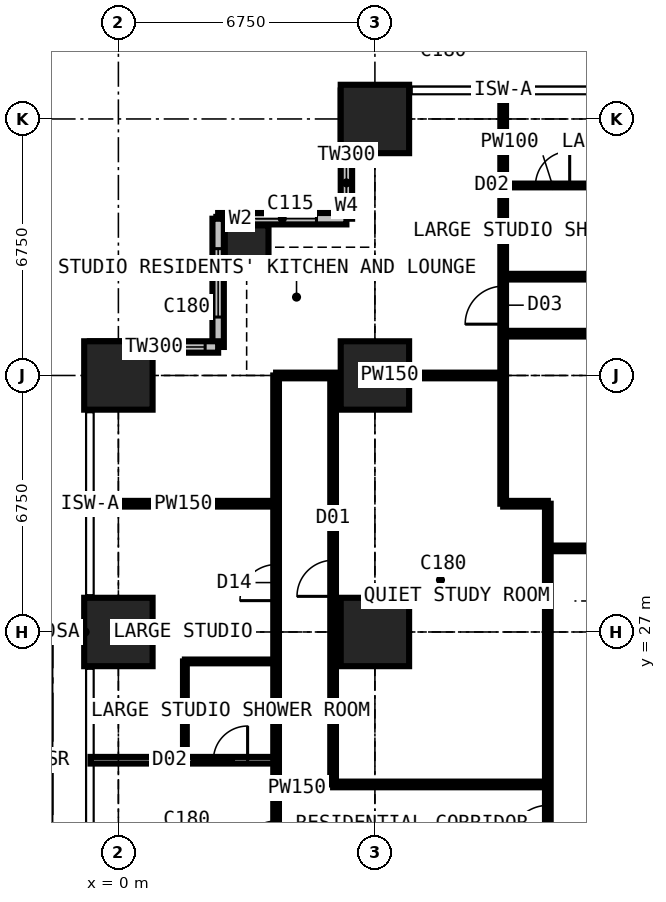
"""IFC4 building model, lengths in metres.
Left out: names, types, materials, properties, quantities, classifications, styles, units other than length and angle.
Written with IfcOpenShell. Run it as: python <this file> out.ifc"""

import sys

from ifc_helpers import new_model, si_unit, direction, frame, frame_2d, origin, origin_2d, place, context, subcontext, project, spatial, rectangle, extrude, element, fill, save


model = new_model("IFC4")
c1 = context("Model", 3, precision=1e-05, world=origin(), true_north=direction((0.0, 1.0)))
c2 = subcontext(c1, "Body", "Model", "MODEL_VIEW")
j1 = project(units=[si_unit("LENGTHUNIT", "METRE"), si_unit("PLANEANGLEUNIT", "RADIAN")], contexts=[c1])
p1 = place(None, origin())
s1 = spatial("IfcSite", under=j1, at=p1, CompositionType="ELEMENT")
p2 = place(p1, origin())
s2 = spatial("IfcBuilding", under=s1, at=p2, CompositionType="ELEMENT")
p3 = place(p2, frame((0.0, 0.0, 54.0)))
s3 = spatial("IfcBuildingStorey", under=s2, at=p3, CompositionType="ELEMENT", Elevation=54.0)
for number, where, z_axis, x_axis in (
    (1, (0.0, 27.0, 0.0), (0.0, 0.0, 1.0), (1.0, 0.0, 0.0)),
    (2, (0.0, 33.75, 0.0), (0.0, 0.0, 1.0), (1.0, 0.0, 0.0)),
):
    element("IfcColumn", number, at=place(p3, frame(where, z_axis=z_axis, x_axis=x_axis)), inside=s3, PredefinedType="COLUMN", context=c2, shape_type="SweptSolid", body=[
        extrude(rectangle(XDim=1.8, YDim=1.8, at=origin_2d()), origin(), (0.0, 0.0, 1.0), 3.6),
    ])
p4 = place(p3, frame((3.375, 37.125, 0.0), z_axis=(0.0, 0.0, 1.0), x_axis=(1.0, 0.0, 0.0)))
e3 = element("IfcColumn", 3, at=p4, inside=s3, PredefinedType="COLUMN", context=c2, shape_type="SweptSolid", body=[
    extrude(rectangle(XDim=1.15, YDim=1.15, at=origin_2d()), origin(), (0.0, 0.0, 1.0), 3.6),
])
for number, where, z_axis, x_axis in (
    (4, (6.75, 27.0, 0.0), (0.0, 0.0, 1.0), (1.0, 0.0, 0.0)),
    (5, (6.75, 33.75, 0.0), (0.0, 0.0, 1.0), (1.0, 0.0, 0.0)),
    (6, (6.75, 40.5, 0.0), (0.0, 0.0, 1.0), (1.0, 0.0, 0.0)),
):
    element("IfcColumn", number, at=place(p3, frame(where, z_axis=z_axis, x_axis=x_axis)), inside=s3, PredefinedType="COLUMN", context=c2, shape_type="SweptSolid", body=[
        extrude(rectangle(XDim=1.8, YDim=1.8, at=origin_2d()), origin(), (0.0, 0.0, 1.0), 3.6),
    ])
p5 = place(p3, frame((6.0, 41.25, 0.0), z_axis=(0.0, 0.0, 1.0), x_axis=(0.0, -1.0, 0.0)))
e7 = element("IfcWall", 7, at=p5, inside=s3, PredefinedType="SOLIDWALL", context=c2, shape_type="SweptSolid", body=[
    extrude(rectangle(XDim=3.375, YDim=0.3, at=frame_2d((1.688, 0.0))), origin(), (0.0, 0.0, 1.0), 3.375),
])
p6 = place(p5, frame((1.833, 0.0, 0.9)))
e8 = element("IfcOpeningElement", 8, at=p6, cuts=e7, PredefinedType="OPENING", context=c2, shape_type="SweptSolid", body=[
    extrude(rectangle(XDim=1.2, YDim=1.8, at=frame_2d((0.6, 0.9))), frame((0.0, 0.16, 0.0), z_axis=(0.0, -1.0, 0.0), x_axis=(1.0, 0.0, 0.0)), (0.0, 0.0, 1.0), 0.32),
])
p7 = place(p3, frame((6.0, 37.875, 0.0), z_axis=(0.0, 0.0, 1.0), x_axis=(-1.0, 0.0, 0.0)))
e9 = element("IfcWall", 9, at=p7, inside=s3, PredefinedType="SOLIDWALL", context=c2, shape_type="SweptSolid", body=[
    extrude(rectangle(XDim=3.375, YDim=0.3, at=frame_2d((1.688, 0.0))), origin(), (0.0, 0.0, 1.0), 3.375),
])
p8 = place(p7, frame((0.788, 0.0, 0.6)))
e10 = element("IfcOpeningElement", 10, at=p8, cuts=e9, PredefinedType="OPENING", context=c2, shape_type="SweptSolid", body=[
    extrude(rectangle(XDim=1.8, YDim=2.1, at=frame_2d((0.9, 1.05))), frame((0.0, 0.16, 0.0), z_axis=(0.0, -1.0, 0.0), x_axis=(1.0, 0.0, 0.0)), (0.0, 0.0, 1.0), 0.32),
])
p9 = place(p3, frame((2.625, 37.875, 0.0), z_axis=(0.0, 0.0, 1.0), x_axis=(0.0, -1.0, 0.0)))
e11 = element("IfcWall", 11, at=p9, inside=s3, PredefinedType="SOLIDWALL", context=c2, shape_type="SweptSolid", body=[
    extrude(rectangle(XDim=3.375, YDim=0.3, at=frame_2d((1.688, 0.0))), origin(), (0.0, 0.0, 1.0), 3.375),
])
p10 = place(p9, frame((0.788, 0.0, 0.6)))
e12 = element("IfcOpeningElement", 12, at=p10, cuts=e11, PredefinedType="OPENING", context=c2, shape_type="SweptSolid", body=[
    extrude(rectangle(XDim=1.8, YDim=2.1, at=frame_2d((0.9, 1.05))), frame((0.0, 0.16, 0.0), z_axis=(0.0, -1.0, 0.0), x_axis=(1.0, 0.0, 0.0)), (0.0, 0.0, 1.0), 0.32),
])
p11 = place(p3, frame((2.625, 34.5, 0.0), z_axis=(0.0, 0.0, 1.0), x_axis=(-1.0, 0.0, 0.0)))
e13 = element("IfcWall", 13, at=p11, inside=s3, PredefinedType="SOLIDWALL", context=c2, shape_type="SweptSolid", body=[
    extrude(rectangle(XDim=3.375, YDim=0.3, at=frame_2d((1.688, 0.0))), origin(), (0.0, 0.0, 1.0), 3.375),
])
p12 = place(p11, frame((0.343, 0.0, 0.9)))
e14 = element("IfcOpeningElement", 14, at=p12, cuts=e13, PredefinedType="OPENING", context=c2, shape_type="SweptSolid", body=[
    extrude(rectangle(XDim=1.2, YDim=1.8, at=frame_2d((0.6, 0.9))), frame((0.0, 0.16, 0.0), z_axis=(0.0, -1.0, 0.0), x_axis=(1.0, 0.0, 0.0)), (0.0, 0.0, 1.0), 0.32),
])
p13 = place(p3, frame((-0.734, 23.625, 0.0), z_axis=(0.0, 0.0, 1.0), x_axis=(1.0, 0.0, 0.0)))
e15 = element("IfcWall", 15, at=p13, inside=s3, PredefinedType="PARTITIONING", context=c2, shape_type="SweptSolid", body=[
    extrude(rectangle(XDim=4.884, YDim=0.175, at=frame_2d((2.442, 0.0))), origin(), (0.0, 0.0, 1.0), 3.375),
])
p14 = place(p13, frame((3.234, 0.0, 0.0)))
e16 = element("IfcOpeningElement", 16, at=p14, cuts=e15, PredefinedType="OPENING", context=c2, shape_type="SweptSolid", body=[
    extrude(rectangle(XDim=0.9, YDim=2.2, at=frame_2d((0.45, 1.1))), frame((0.0, 0.097, 0.0), z_axis=(0.0, -1.0, 0.0), x_axis=(1.0, 0.0, 0.0)), (0.0, 0.0, 1.0), 0.195),
])
p15 = place(p3, frame((-0.734, 30.375, 0.0), z_axis=(0.0, 0.0, 1.0), x_axis=(1.0, 0.0, 0.0)))
e17 = element("IfcWall", 17, at=p15, inside=s3, PredefinedType="PARTITIONING", context=c2, shape_type="SweptSolid", body=[
    extrude(rectangle(XDim=4.884, YDim=0.15, at=frame_2d((2.442, 0.0))), origin(), (0.0, 0.0, 1.0), 3.375),
])
p16 = place(p3, frame((1.75, 23.625, 0.0), z_axis=(0.0, 0.0, 1.0), x_axis=(0.0, 1.0, 0.0)))
e18 = element("IfcWall", 18, at=p16, inside=s3, PredefinedType="PARTITIONING", context=c2, shape_type="SweptSolid", body=[
    extrude(rectangle(XDim=2.6, YDim=0.1, at=frame_2d((1.3, 0.0))), origin(), (0.0, 0.0, 1.0), 3.375),
])
p17 = place(p3, frame((1.75, 26.225, 0.0), z_axis=(0.0, 0.0, 1.0), x_axis=(1.0, 0.0, 0.0)))
e19 = element("IfcWall", 19, at=p17, inside=s3, PredefinedType="PARTITIONING", context=c2, shape_type="SweptSolid", body=[
    extrude(rectangle(XDim=2.4, YDim=0.1, at=frame_2d((1.2, 0.0))), origin(), (0.0, 0.0, 1.0), 3.375),
])
p18 = place(p3, frame((4.15, 10.125, 0.0), z_axis=(0.0, 0.0, 1.0), x_axis=(0.0, 1.0, 0.0)))
e20 = element("IfcWall", 20, at=p18, inside=s3, PredefinedType="PARTITIONING", context=c2, shape_type="SweptSolid", body=[
    extrude(rectangle(XDim=23.625, YDim=0.15, at=frame_2d((11.812, 0.0))), origin(), (0.0, 0.0, 1.0), 3.375),
])
p19 = place(p18, frame((4.2, 0.0, 0.0)))
e21 = element("IfcOpeningElement", 21, at=p19, cuts=e20, PredefinedType="OPENING", context=c2, shape_type="SweptSolid", body=[
    extrude(rectangle(XDim=0.95, YDim=2.2, at=frame_2d((0.475, 1.1))), frame((0.0, 0.085, 0.0), z_axis=(0.0, -1.0, 0.0), x_axis=(1.0, 0.0, 0.0)), (0.0, 0.0, 1.0), 0.17),
])
p20 = place(p18, frame((10.95, 0.0, 0.0)))
e22 = element("IfcOpeningElement", 22, at=p20, cuts=e20, PredefinedType="OPENING", context=c2, shape_type="SweptSolid", body=[
    extrude(rectangle(XDim=0.95, YDim=2.2, at=frame_2d((0.475, 1.1))), frame((0.0, 0.085, 0.0), z_axis=(0.0, -1.0, 0.0), x_axis=(1.0, 0.0, 0.0)), (0.0, 0.0, 1.0), 0.17),
])
p21 = place(p18, frame((17.7, 0.0, 0.0)))
e23 = element("IfcOpeningElement", 23, at=p21, cuts=e20, PredefinedType="OPENING", context=c2, shape_type="SweptSolid", body=[
    extrude(rectangle(XDim=0.95, YDim=2.2, at=frame_2d((0.475, 1.1))), frame((0.0, 0.085, 0.0), z_axis=(0.0, -1.0, 0.0), x_axis=(1.0, 0.0, 0.0)), (0.0, 0.0, 1.0), 0.17),
])
p22 = place(p3, frame((4.15, 33.75, 0.0), z_axis=(0.0, 0.0, 1.0), x_axis=(1.0, 0.0, 0.0)))
e24 = element("IfcWall", 24, at=p22, inside=s3, PredefinedType="PARTITIONING", context=c2, shape_type="SweptSolid", body=[
    extrude(rectangle(XDim=5.975, YDim=0.15, at=frame_2d((2.988, 0.0))), origin(), (0.0, 0.0, 1.0), 2.877),
])
p23 = place(p3, frame((5.65, 22.988, 0.0), z_axis=(0.0, 0.0, 1.0), x_axis=(0.0, 1.0, 0.0)))
e25 = element("IfcWall", 25, at=p23, inside=s3, PredefinedType="PARTITIONING", context=c2, shape_type="SweptSolid", body=[
    extrude(rectangle(XDim=10.762, YDim=0.15, at=frame_2d((5.381, 0.0))), origin(), (0.0, 0.0, 1.0), 3.375),
])
p24 = place(p23, frame((4.95, 0.0, 0.0)))
e26 = element("IfcOpeningElement", 26, at=p24, cuts=e25, PredefinedType="OPENING", context=c2, shape_type="SweptSolid", body=[
    extrude(rectangle(XDim=0.95, YDim=2.2, at=frame_2d((0.475, 1.1))), frame((0.0, 0.085, 0.0), z_axis=(0.0, -1.0, 0.0), x_axis=(1.0, 0.0, 0.0)), (0.0, 0.0, 1.0), 0.17),
])
p25 = place(p3, frame((5.65, 22.988, 0.0), z_axis=(0.0, 0.0, 1.0), x_axis=(1.0, 0.0, 0.0)))
e27 = element("IfcWall", 27, at=p25, inside=s3, PredefinedType="PARTITIONING", context=c2, shape_type="SweptSolid", body=[
    extrude(rectangle(XDim=5.65, YDim=0.15, at=frame_2d((2.825, 0.0))), origin(), (0.0, 0.0, 1.0), 3.375),
])
p26 = place(p3, frame((10.125, 30.375, 0.0), z_axis=(0.0, 0.0, 1.0), x_axis=(0.0, 1.0, 0.0)))
e28 = element("IfcWall", 28, at=p26, inside=s3, PredefinedType="PARTITIONING", context=c2, shape_type="SweptSolid", body=[
    extrude(rectangle(XDim=10.859, YDim=0.15, at=frame_2d((5.429, 0.0))), origin(), (0.0, 0.0, 1.0), 3.375),
])
p27 = place(p26, frame((4.725, 0.0, 0.0)))
e29 = element("IfcOpeningElement", 29, at=p27, cuts=e28, PredefinedType="OPENING", context=c2, shape_type="SweptSolid", body=[
    extrude(rectangle(XDim=1.0, YDim=2.2, at=frame_2d((0.5, 1.1))), frame((0.0, 0.085, 0.0), z_axis=(0.0, -1.0, 0.0), x_axis=(1.0, 0.0, 0.0)), (0.0, 0.0, 1.0), 0.17),
])
p28 = place(p3, frame((10.125, 30.375, 0.0), z_axis=(0.0, 0.0, 1.0), x_axis=(1.0, 0.0, 0.0)))
e30 = element("IfcWall", 30, at=p28, inside=s3, PredefinedType="PARTITIONING", context=c2, shape_type="SweptSolid", body=[
    extrude(rectangle(XDim=1.175, YDim=0.15, at=frame_2d((0.587, 0.0))), origin(), (0.0, 0.0, 1.0), 3.375),
])
p29 = place(p3, frame((10.125, 34.85, 0.0), z_axis=(0.0, 0.0, 1.0), x_axis=(1.0, 0.0, 0.0)))
e31 = element("IfcWall", 31, at=p29, inside=s3, PredefinedType="PARTITIONING", context=c2, shape_type="SweptSolid", body=[
    extrude(rectangle(XDim=10.762, YDim=0.15, at=frame_2d((5.381, 0.0))), origin(), (0.0, 0.0, 1.0), 3.375),
])
p30 = place(p29, frame((4.9, 0.0, 0.0)))
e32 = element("IfcOpeningElement", 32, at=p30, cuts=e31, PredefinedType="OPENING", context=c2, shape_type="SweptSolid", body=[
    extrude(rectangle(XDim=0.95, YDim=2.2, at=frame_2d((0.475, 1.1))), frame((0.0, 0.085, 0.0), z_axis=(0.0, -1.0, 0.0), x_axis=(1.0, 0.0, 0.0)), (0.0, 0.0, 1.0), 0.17),
])
p31 = place(p3, frame((10.125, 36.35, 0.0), z_axis=(0.0, 0.0, 1.0), x_axis=(1.0, 0.0, 0.0)))
e33 = element("IfcWall", 33, at=p31, inside=s3, PredefinedType="PARTITIONING", context=c2, shape_type="SweptSolid", body=[
    extrude(rectangle(XDim=23.625, YDim=0.15, at=frame_2d((11.812, 0.0))), origin(), (0.0, 0.0, 1.0), 3.375),
])
p32 = place(p31, frame((20.5, 0.0, 0.0)))
e34 = element("IfcOpeningElement", 34, at=p32, cuts=e33, PredefinedType="OPENING", context=c2, shape_type="SweptSolid", body=[
    extrude(rectangle(XDim=0.95, YDim=2.2, at=frame_2d((0.475, 1.1))), frame((0.0, 0.085, 0.0), z_axis=(0.0, -1.0, 0.0), x_axis=(1.0, 0.0, 0.0)), (0.0, 0.0, 1.0), 0.17),
])
p33 = place(p31, frame((17.125, 0.0, 0.0)))
e35 = element("IfcOpeningElement", 35, at=p33, cuts=e33, PredefinedType="OPENING", context=c2, shape_type="SweptSolid", body=[
    extrude(rectangle(XDim=0.95, YDim=2.2, at=frame_2d((0.475, 1.1))), frame((0.0, 0.085, 0.0), z_axis=(0.0, -1.0, 0.0), x_axis=(1.0, 0.0, 0.0)), (0.0, 0.0, 1.0), 0.17),
])
p34 = place(p31, frame((13.7, 0.0, 0.0)))
e36 = element("IfcOpeningElement", 36, at=p34, cuts=e33, PredefinedType="OPENING", context=c2, shape_type="SweptSolid", body=[
    extrude(rectangle(XDim=0.95, YDim=2.2, at=frame_2d((0.475, 1.1))), frame((0.0, 0.085, 0.0), z_axis=(0.0, -1.0, 0.0), x_axis=(1.0, 0.0, 0.0)), (0.0, 0.0, 1.0), 0.17),
])
p35 = place(p31, frame((4.2, 0.0, 0.0)))
e37 = element("IfcOpeningElement", 37, at=p35, cuts=e33, PredefinedType="OPENING", context=c2, shape_type="SweptSolid", body=[
    extrude(rectangle(XDim=0.95, YDim=2.2, at=frame_2d((0.475, 1.1))), frame((0.0, 0.085, 0.0), z_axis=(0.0, -1.0, 0.0), x_axis=(1.0, 0.0, 0.0)), (0.0, 0.0, 1.0), 0.17),
])
p36 = place(p31, frame((10.95, 0.0, 0.0)))
e38 = element("IfcOpeningElement", 38, at=p36, cuts=e33, PredefinedType="OPENING", context=c2, shape_type="SweptSolid", body=[
    extrude(rectangle(XDim=0.95, YDim=2.2, at=frame_2d((0.475, 1.1))), frame((0.0, 0.085, 0.0), z_axis=(0.0, -1.0, 0.0), x_axis=(1.0, 0.0, 0.0)), (0.0, 0.0, 1.0), 0.17),
])
p37 = place(p3, frame((10.125, 38.75, 0.0), z_axis=(0.0, 0.0, 1.0), x_axis=(1.0, 0.0, 0.0)))
e39 = element("IfcWall", 39, at=p37, inside=s3, PredefinedType="PARTITIONING", context=c2, shape_type="SweptSolid", body=[
    extrude(rectangle(XDim=2.6, YDim=0.1, at=frame_2d((1.3, 0.0))), origin(), (0.0, 0.0, 1.0), 3.375),
])
p38 = place(p37, frame((0.85, 0.0, 0.0)))
e40 = element("IfcOpeningElement", 40, at=p38, cuts=e39, PredefinedType="OPENING", context=c2, shape_type="SweptSolid", body=[
    extrude(rectangle(XDim=0.9, YDim=2.2, at=frame_2d((0.45, 1.1))), frame((0.0, 0.06, 0.0), z_axis=(0.0, -1.0, 0.0), x_axis=(1.0, 0.0, 0.0)), (0.0, 0.0, 1.0), 0.12),
])
p39 = place(p3, frame((11.3, 11.3, 0.0), z_axis=(0.0, 0.0, 1.0), x_axis=(0.0, 1.0, 0.0)))
e41 = element("IfcWall", 41, at=p39, inside=s3, PredefinedType="PARTITIONING", context=c2, shape_type="SweptSolid", body=[
    extrude(rectangle(XDim=19.075, YDim=0.15, at=frame_2d((9.538, 0.0))), origin(), (0.0, 0.0, 1.0), 3.375),
])
p40 = place(p39, frame((10.137, 0.0, 0.0)))
e42 = element("IfcOpeningElement", 42, at=p40, cuts=e41, PredefinedType="OPENING", context=c2, shape_type="SweptSolid", body=[
    extrude(rectangle(XDim=1.0, YDim=2.2, at=frame_2d((0.5, 1.1))), frame((0.0, 0.085, 0.0), z_axis=(0.0, -1.0, 0.0), x_axis=(1.0, 0.0, 0.0)), (0.0, 0.0, 1.0), 0.17),
])
p41 = place(p3, frame((11.3, 29.2, 0.0), z_axis=(0.0, 0.0, 1.0), x_axis=(1.0, 0.0, 0.0)))
e43 = element("IfcWall", 43, at=p41, inside=s3, PredefinedType="PARTITIONING", context=c2, shape_type="SweptSolid", body=[
    extrude(rectangle(XDim=19.075, YDim=0.15, at=frame_2d((9.538, 0.0))), origin(), (0.0, 0.0, 1.0), 3.375),
])
p42 = place(p41, frame((12.875, 0.0, 0.0)))
e44 = element("IfcOpeningElement", 44, at=p42, cuts=e43, PredefinedType="OPENING", context=c2, shape_type="SweptSolid", body=[
    extrude(rectangle(XDim=1.0, YDim=2.2, at=frame_2d((0.5, 1.1))), frame((0.0, 0.085, 0.0), z_axis=(0.0, -1.0, 0.0), x_axis=(1.0, 0.0, 0.0)), (0.0, 0.0, 1.0), 0.17),
])
p43 = place(p41, frame((10.438, 0.0, 0.0)))
e45 = element("IfcOpeningElement", 45, at=p43, cuts=e43, PredefinedType="OPENING", context=c2, shape_type="SweptSolid", body=[
    extrude(rectangle(XDim=1.0, YDim=2.2, at=frame_2d((0.5, 1.1))), frame((0.0, 0.085, 0.0), z_axis=(0.0, -1.0, 0.0), x_axis=(1.0, 0.0, 0.0)), (0.0, 0.0, 1.0), 0.17),
])
p44 = place(p41, frame((14.875, 0.0, 0.0)))
e46 = element("IfcOpeningElement", 46, at=p44, cuts=e43, PredefinedType="OPENING", context=c2, shape_type="SweptSolid", body=[
    extrude(rectangle(XDim=0.95, YDim=2.2, at=frame_2d((0.475, 1.1))), frame((0.0, 0.085, 0.0), z_axis=(0.0, -1.0, 0.0), x_axis=(1.0, 0.0, 0.0)), (0.0, 0.0, 1.0), 0.17),
])
p45 = place(p6, origin())
e47 = element("IfcWindow", 47, at=p45, inside=s3, PartitioningType="SINGLE_PANEL", PredefinedType="WINDOW", context=c2, shape_type="SweptSolid", body=[
    extrude(rectangle(XDim=1.2, YDim=1.8, at=frame_2d((0.6, 0.9))), frame((0.0, 0.03, 0.0), z_axis=(0.0, -1.0, 0.0), x_axis=(1.0, 0.0, 0.0)), (0.0, 0.0, 1.0), 0.06),
])
fill(e8, e47)
p46 = place(p8, origin())
e48 = element("IfcWindow", 48, at=p46, inside=s3, PartitioningType="SINGLE_PANEL", PredefinedType="WINDOW", context=c2, shape_type="SweptSolid", body=[
    extrude(rectangle(XDim=1.8, YDim=2.1, at=frame_2d((0.9, 1.05))), frame((0.0, 0.03, 0.0), z_axis=(0.0, -1.0, 0.0), x_axis=(1.0, 0.0, 0.0)), (0.0, 0.0, 1.0), 0.06),
])
fill(e10, e48)
p47 = place(p10, origin())
e49 = element("IfcWindow", 49, at=p47, inside=s3, PartitioningType="SINGLE_PANEL", PredefinedType="WINDOW", context=c2, shape_type="SweptSolid", body=[
    extrude(rectangle(XDim=1.8, YDim=2.1, at=frame_2d((0.9, 1.05))), frame((0.0, 0.03, 0.0), z_axis=(0.0, -1.0, 0.0), x_axis=(1.0, 0.0, 0.0)), (0.0, 0.0, 1.0), 0.06),
])
fill(e12, e49)
p48 = place(p12, origin())
e50 = element("IfcWindow", 50, at=p48, inside=s3, PartitioningType="SINGLE_PANEL", PredefinedType="WINDOW", context=c2, shape_type="SweptSolid", body=[
    extrude(rectangle(XDim=1.2, YDim=1.8, at=frame_2d((0.6, 0.9))), frame((0.0, 0.03, 0.0), z_axis=(0.0, -1.0, 0.0), x_axis=(1.0, 0.0, 0.0)), (0.0, 0.0, 1.0), 0.06),
])
fill(e14, e50)
p49 = place(p38, origin())
e51 = element("IfcDoor", 51, at=p49, inside=s3, OperationType="SINGLE_SWING_RIGHT", PredefinedType="DOOR", context=c2, shape_type="SweptSolid", body=[
    extrude(rectangle(XDim=0.9, YDim=2.2, at=frame_2d((0.45, 1.1))), frame((0.0, 0.025, 0.0), z_axis=(0.0, -1.0, 0.0), x_axis=(1.0, 0.0, 0.0)), (0.0, 0.0, 1.0), 0.05),
])
fill(e40, e51)
p50 = place(p27, origin())
e52 = element("IfcDoor", 52, at=p50, inside=s3, OperationType="SINGLE_SWING_LEFT", PredefinedType="DOOR", context=c2, shape_type="SweptSolid", body=[
    extrude(rectangle(XDim=1.0, YDim=2.2, at=frame_2d((0.5, 1.1))), frame((0.0, 0.025, 0.0), z_axis=(0.0, -1.0, 0.0), x_axis=(1.0, 0.0, 0.0)), (0.0, 0.0, 1.0), 0.05),
])
fill(e29, e52)
p51 = place(p20, origin())
e53 = element("IfcDoor", 53, at=p51, inside=s3, OperationType="SINGLE_SWING_LEFT", PredefinedType="DOOR", context=c2, shape_type="SweptSolid", body=[
    extrude(rectangle(XDim=0.95, YDim=2.2, at=frame_2d((0.475, 1.1))), frame((0.0, 0.025, 0.0), z_axis=(0.0, -1.0, 0.0), x_axis=(1.0, 0.0, 0.0)), (0.0, 0.0, 1.0), 0.05),
])
fill(e22, e53)
p52 = place(p21, origin())
e54 = element("IfcDoor", 54, at=p52, inside=s3, OperationType="SINGLE_SWING_LEFT", PredefinedType="DOOR", context=c2, shape_type="SweptSolid", body=[
    extrude(rectangle(XDim=0.95, YDim=2.2, at=frame_2d((0.475, 1.1))), frame((0.0, 0.025, 0.0), z_axis=(0.0, -1.0, 0.0), x_axis=(1.0, 0.0, 0.0)), (0.0, 0.0, 1.0), 0.05),
])
fill(e23, e54)
p53 = place(p14, origin())
e55 = element("IfcDoor", 55, at=p53, inside=s3, OperationType="SINGLE_SWING_RIGHT", PredefinedType="DOOR", context=c2, shape_type="SweptSolid", body=[
    extrude(rectangle(XDim=0.9, YDim=2.2, at=frame_2d((0.45, 1.1))), frame((0.0, 0.025, 0.0), z_axis=(0.0, -1.0, 0.0), x_axis=(1.0, 0.0, 0.0)), (0.0, 0.0, 1.0), 0.05),
])
fill(e16, e55)
p54 = place(p40, origin())
e56 = element("IfcDoor", 56, at=p54, inside=s3, OperationType="SINGLE_SWING_LEFT", PredefinedType="DOOR", context=c2, shape_type="SweptSolid", body=[
    extrude(rectangle(XDim=1.0, YDim=2.2, at=frame_2d((0.5, 1.1))), frame((0.0, 0.025, 0.0), z_axis=(0.0, -1.0, 0.0), x_axis=(1.0, 0.0, 0.0)), (0.0, 0.0, 1.0), 0.05),
])
fill(e42, e56)
p55 = place(p24, origin())
e57 = element("IfcDoor", 57, at=p55, inside=s3, OperationType="SINGLE_SWING_LEFT", PredefinedType="DOOR", context=c2, shape_type="SweptSolid", body=[
    extrude(rectangle(XDim=0.95, YDim=2.2, at=frame_2d((0.475, 1.1))), frame((0.0, 0.025, 0.0), z_axis=(0.0, -1.0, 0.0), x_axis=(1.0, 0.0, 0.0)), (0.0, 0.0, 1.0), 0.05),
])
fill(e26, e57)
save(model, sys.argv[1])
